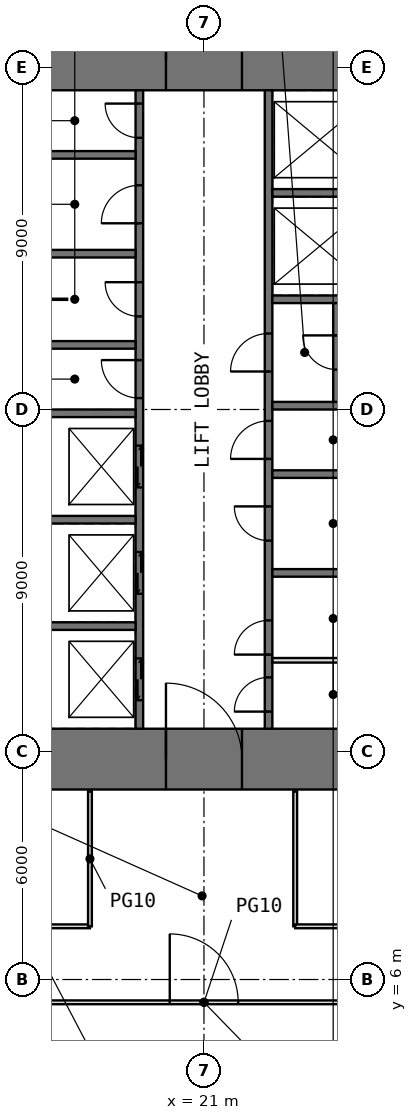
"""IFC4 building model, lengths in metres.
Left out: names, types, materials, properties, quantities, classifications, styles, units other than length and angle.
Written with IfcOpenShell. Run it as: python <this file> out.ifc"""

import sys

from ifc_helpers import new_model, si_unit, direction, frame, frame_2d, origin, place, context, subcontext, project, spatial, rectangle, extrude, element, fill, save


model = new_model("IFC4")
c1 = context("Model", 3, precision=1e-05, world=origin(), true_north=direction((0.0, 1.0)))
c2 = subcontext(c1, "Body", "Model", "MODEL_VIEW")
j1 = project(units=[si_unit("LENGTHUNIT", "METRE"), si_unit("PLANEANGLEUNIT", "RADIAN")], contexts=[c1])
p1 = place(None, origin())
s1 = spatial("IfcSite", under=j1, at=p1, CompositionType="ELEMENT")
p2 = place(p1, origin())
s2 = spatial("IfcBuilding", under=s1, at=p2, CompositionType="ELEMENT")
p3 = place(p2, frame((0.0, 0.0, 100.5)))
s3 = spatial("IfcBuildingStorey", under=s2, at=p3, CompositionType="ELEMENT", Elevation=100.5)
p4 = place(p3, frame((11.0, 11.8, -0.05), z_axis=(0.0, 0.0, 1.0), x_axis=(1.0, 0.0, 0.0)))
e1 = element("IfcWall", 1, at=p4, inside=s3, PredefinedType="SHEAR", context=c2, shape_type="SweptSolid", body=[
    extrude(rectangle(XDim=20.0, YDim=1.6, at=frame_2d((10.0, 0.0))), origin(), (0.0, 0.0, 1.0), 4.0),
])
p5 = place(p4, frame((9.0, 0.0, 0.05)))
e2 = element("IfcOpeningElement", 2, at=p5, cuts=e1, PredefinedType="OPENING", context=c2, shape_type="SweptSolid", body=[
    extrude(rectangle(XDim=2.0, YDim=2.2, at=frame_2d((1.0, 1.1))), frame((0.0, 0.81, 0.0), z_axis=(0.0, -1.0, 0.0), x_axis=(1.0, 0.0, 0.0)), (0.0, 0.0, 1.0), 1.62),
])
p6 = place(p3, frame((11.0, 30.2, -0.05), z_axis=(0.0, 0.0, 1.0), x_axis=(1.0, 0.0, 0.0)))
e3 = element("IfcWall", 3, at=p6, inside=s3, PredefinedType="SHEAR", context=c2, shape_type="SweptSolid", body=[
    extrude(rectangle(XDim=20.0, YDim=1.6, at=frame_2d((10.0, 0.0))), origin(), (0.0, 0.0, 1.0), 4.0),
])
p7 = place(p6, frame((9.0, 0.0, 0.05)))
e4 = element("IfcOpeningElement", 4, at=p7, cuts=e3, PredefinedType="OPENING", context=c2, shape_type="SweptSolid", body=[
    extrude(rectangle(XDim=2.0, YDim=2.2, at=frame_2d((1.0, 1.1))), frame((0.0, 0.81, 0.0), z_axis=(0.0, -1.0, 0.0), x_axis=(1.0, 0.0, 0.0)), (0.0, 0.0, 1.0), 1.62),
])
p8 = place(p3, frame((19.3, 12.6, -0.05), z_axis=(0.0, 0.0, 1.0), x_axis=(0.0, 1.0, 0.0)))
e5 = element("IfcWall", 5, at=p8, inside=s3, PredefinedType="SHEAR", context=c2, shape_type="SweptSolid", body=[
    extrude(rectangle(XDim=16.8, YDim=0.2, at=frame_2d((8.4, 0.0))), origin(), (0.0, 0.0, 1.0), 4.0),
])
p9 = place(p8, frame((8.7, 0.0, 0.05)))
e6 = element("IfcOpeningElement", 6, at=p9, cuts=e5, PredefinedType="OPENING", context=c2, shape_type="SweptSolid", body=[
    extrude(rectangle(XDim=1.0, YDim=2.2, at=frame_2d((0.5, 1.1))), frame((0.0, 0.11, 0.0), z_axis=(0.0, -1.0, 0.0), x_axis=(1.0, 0.0, 0.0)), (0.0, 0.0, 1.0), 0.22),
])
p10 = place(p8, frame((10.85, 0.0, 0.05)))
e7 = element("IfcOpeningElement", 7, at=p10, cuts=e5, PredefinedType="OPENING", context=c2, shape_type="SweptSolid", body=[
    extrude(rectangle(XDim=0.9, YDim=2.2, at=frame_2d((0.45, 1.1))), frame((0.0, 0.11, 0.0), z_axis=(0.0, -1.0, 0.0), x_axis=(1.0, 0.0, 0.0)), (0.0, 0.0, 1.0), 0.22),
])
p11 = place(p8, frame((13.3, 0.0, 0.05)))
e8 = element("IfcOpeningElement", 8, at=p11, cuts=e5, PredefinedType="OPENING", context=c2, shape_type="SweptSolid", body=[
    extrude(rectangle(XDim=1.0, YDim=2.2, at=frame_2d((0.5, 1.1))), frame((0.0, 0.11, 0.0), z_axis=(0.0, -1.0, 0.0), x_axis=(1.0, 0.0, 0.0)), (0.0, 0.0, 1.0), 0.22),
])
p12 = place(p8, frame((15.55, 0.0, 0.05)))
e9 = element("IfcOpeningElement", 9, at=p12, cuts=e5, PredefinedType="OPENING", context=c2, shape_type="SweptSolid", body=[
    extrude(rectangle(XDim=0.9, YDim=2.2, at=frame_2d((0.45, 1.1))), frame((0.0, 0.11, 0.0), z_axis=(0.0, -1.0, 0.0), x_axis=(1.0, 0.0, 0.0)), (0.0, 0.0, 1.0), 0.22),
])
p13 = place(p8, frame((0.75, 0.0, 0.05)))
e10 = element("IfcOpeningElement", 10, at=p13, cuts=e5, PredefinedType="OPENING", context=c2, shape_type="SweptSolid", body=[
    extrude(rectangle(XDim=1.1, YDim=2.2, at=frame_2d((0.55, 1.1))), frame((0.0, 0.11, 0.0), z_axis=(0.0, -1.0, 0.0), x_axis=(1.0, 0.0, 0.0)), (0.0, 0.0, 1.0), 0.22),
])
p14 = place(p8, frame((3.55, 0.0, 0.05)))
e11 = element("IfcOpeningElement", 11, at=p14, cuts=e5, PredefinedType="OPENING", context=c2, shape_type="SweptSolid", body=[
    extrude(rectangle(XDim=1.1, YDim=2.2, at=frame_2d((0.55, 1.1))), frame((0.0, 0.11, 0.0), z_axis=(0.0, -1.0, 0.0), x_axis=(1.0, 0.0, 0.0)), (0.0, 0.0, 1.0), 0.22),
])
p15 = place(p8, frame((6.35, 0.0, 0.05)))
e12 = element("IfcOpeningElement", 12, at=p15, cuts=e5, PredefinedType="OPENING", context=c2, shape_type="SweptSolid", body=[
    extrude(rectangle(XDim=1.1, YDim=2.2, at=frame_2d((0.55, 1.1))), frame((0.0, 0.11, 0.0), z_axis=(0.0, -1.0, 0.0), x_axis=(1.0, 0.0, 0.0)), (0.0, 0.0, 1.0), 0.22),
])
p16 = place(p3, frame((22.7, 12.6, -0.05), z_axis=(0.0, 0.0, 1.0), x_axis=(0.0, 1.0, 0.0)))
e13 = element("IfcWall", 13, at=p16, inside=s3, PredefinedType="SHEAR", context=c2, shape_type="SweptSolid", body=[
    extrude(rectangle(XDim=16.8, YDim=0.2, at=frame_2d((8.4, 0.0))), origin(), (0.0, 0.0, 1.0), 4.0),
])
p17 = place(p16, frame((0.45, 0.0, 0.05)))
e14 = element("IfcOpeningElement", 14, at=p17, cuts=e13, PredefinedType="OPENING", context=c2, shape_type="SweptSolid", body=[
    extrude(rectangle(XDim=0.9, YDim=2.2, at=frame_2d((0.45, 1.1))), frame((0.0, 0.11, 0.0), z_axis=(0.0, -1.0, 0.0), x_axis=(1.0, 0.0, 0.0)), (0.0, 0.0, 1.0), 0.22),
])
p18 = place(p16, frame((7.1, 0.0, 0.05)))
e15 = element("IfcOpeningElement", 15, at=p18, cuts=e13, PredefinedType="OPENING", context=c2, shape_type="SweptSolid", body=[
    extrude(rectangle(XDim=1.0, YDim=2.2, at=frame_2d((0.5, 1.1))), frame((0.0, 0.11, 0.0), z_axis=(0.0, -1.0, 0.0), x_axis=(1.0, 0.0, 0.0)), (0.0, 0.0, 1.0), 0.22),
])
p19 = place(p16, frame((1.95, 0.0, 0.05)))
e16 = element("IfcOpeningElement", 16, at=p19, cuts=e13, PredefinedType="OPENING", context=c2, shape_type="SweptSolid", body=[
    extrude(rectangle(XDim=0.9, YDim=2.2, at=frame_2d((0.45, 1.1))), frame((0.0, 0.11, 0.0), z_axis=(0.0, -1.0, 0.0), x_axis=(1.0, 0.0, 0.0)), (0.0, 0.0, 1.0), 0.22),
])
p20 = place(p16, frame((4.95, 0.0, 0.05)))
e17 = element("IfcOpeningElement", 17, at=p20, cuts=e13, PredefinedType="OPENING", context=c2, shape_type="SweptSolid", body=[
    extrude(rectangle(XDim=0.9, YDim=2.2, at=frame_2d((0.45, 1.1))), frame((0.0, 0.11, 0.0), z_axis=(0.0, -1.0, 0.0), x_axis=(1.0, 0.0, 0.0)), (0.0, 0.0, 1.0), 0.22),
])
p21 = place(p16, frame((9.4, 0.0, 0.05)))
e18 = element("IfcOpeningElement", 18, at=p21, cuts=e13, PredefinedType="OPENING", context=c2, shape_type="SweptSolid", body=[
    extrude(rectangle(XDim=1.0, YDim=2.2, at=frame_2d((0.5, 1.1))), frame((0.0, 0.11, 0.0), z_axis=(0.0, -1.0, 0.0), x_axis=(1.0, 0.0, 0.0)), (0.0, 0.0, 1.0), 0.22),
])
for number, where, z_axis, x_axis in (
    (19, (16.0, 15.3, -0.05), (0.0, 0.0, 1.0), (1.0, 0.0, 0.0)),
    (20, (16.0, 18.1, -0.05), (0.0, 0.0, 1.0), (1.0, 0.0, 0.0)),
    (21, (16.0, 20.9, -0.05), (0.0, 0.0, 1.0), (1.0, 0.0, 0.0)),
    (22, (16.0, 22.7, -0.05), (0.0, 0.0, 1.0), (1.0, 0.0, 0.0)),
    (23, (16.0, 25.1, -0.05), (0.0, 0.0, 1.0), (1.0, 0.0, 0.0)),
    (24, (16.0, 27.7, -0.05), (0.0, 0.0, 1.0), (1.0, 0.0, 0.0)),
    (25, (22.8, 16.7, -0.05), (0.0, 0.0, 1.0), (1.0, 0.0, 0.0)),
    (26, (22.8, 19.3, -0.05), (0.0, 0.0, 1.0), (1.0, 0.0, 0.0)),
    (27, (22.8, 21.1, -0.05), (0.0, 0.0, 1.0), (1.0, 0.0, 0.0)),
    (28, (22.8, 23.9, -0.05), (0.0, 0.0, 1.0), (1.0, 0.0, 0.0)),
    (29, (22.8, 26.7, -0.05), (0.0, 0.0, 1.0), (1.0, 0.0, 0.0)),
):
    element("IfcWall", number, at=place(p3, frame(where, z_axis=z_axis, x_axis=x_axis)), inside=s3, PredefinedType="SHEAR", context=c2, shape_type="SweptSolid", body=[
        extrude(rectangle(XDim=3.2, YDim=0.2, at=frame_2d((1.6, 0.0))), origin(), (0.0, 0.0, 1.0), 4.0),
    ])
p22 = place(p3, frame((22.8, 14.4, 0.0), z_axis=(0.0, 0.0, 1.0), x_axis=(1.0, 0.0, 0.0)))
e30 = element("IfcWall", 30, at=p22, inside=s3, PredefinedType="PARTITIONING", context=c2, shape_type="SweptSolid", body=[
    extrude(rectangle(XDim=3.2, YDim=0.12, at=frame_2d((1.6, 0.0))), origin(), (0.0, 0.0, 1.0), 3.75),
])
p23 = place(p3, frame((16.0, 23.9, 0.0), z_axis=(0.0, 0.0, 1.0), x_axis=(1.0, 0.0, 0.0)))
e31 = element("IfcWall", 31, at=p23, inside=s3, PredefinedType="PARTITIONING", context=c2, shape_type="SweptSolid", body=[
    extrude(rectangle(XDim=1.4, YDim=0.03, at=frame_2d((0.7, 0.0))), origin(), (0.0, 0.0, 1.0), 3.75),
])
p24 = place(p3, frame((24.5, 21.2, -0.05), z_axis=(0.0, 0.0, 1.0), x_axis=(0.0, 1.0, 0.0)))
e32 = element("IfcWall", 32, at=p24, inside=s3, PredefinedType="SHEAR", context=c2, shape_type="SweptSolid", body=[
    extrude(rectangle(XDim=2.6, YDim=0.2, at=frame_2d((1.3, 0.0))), origin(), (0.0, 0.0, 1.0), 4.0),
])
p25 = place(p24, frame((0.85, 0.0, 0.05)))
e33 = element("IfcOpeningElement", 33, at=p25, cuts=e32, PredefinedType="OPENING", context=c2, shape_type="SweptSolid", body=[
    extrude(rectangle(XDim=0.9, YDim=2.2, at=frame_2d((0.45, 1.1))), frame((0.0, 0.11, 0.0), z_axis=(0.0, -1.0, 0.0), x_axis=(1.0, 0.0, 0.0)), (0.0, 0.0, 1.0), 0.22),
])
p26 = place(p3, frame((14.6, 7.4, 0.0), z_axis=(0.0, 0.0, 1.0), x_axis=(1.0, 0.0, 0.0)))
e34 = element("IfcWall", 34, at=p26, inside=s3, PredefinedType="PARTITIONING", context=c2, shape_type="SweptSolid", body=[
    extrude(rectangle(XDim=3.4, YDim=0.1, at=frame_2d((1.7, 0.0))), origin(), (0.0, 0.0, 1.0), 3.75),
])
p27 = place(p26, frame((1.2, 0.0, 0.0)))
e35 = element("IfcOpeningElement", 35, at=p27, cuts=e34, PredefinedType="OPENING", context=c2, shape_type="SweptSolid", body=[
    extrude(rectangle(XDim=1.0, YDim=2.4, at=frame_2d((0.5, 1.2))), frame((0.0, 0.06, 0.0), z_axis=(0.0, -1.0, 0.0), x_axis=(1.0, 0.0, 0.0)), (0.0, 0.0, 1.0), 0.12),
])
p28 = place(p3, frame((16.0, 5.4, 0.0), z_axis=(0.0, 0.0, 1.0), x_axis=(1.0, 0.0, 0.0)))
e36 = element("IfcWall", 36, at=p28, inside=s3, PredefinedType="PARTITIONING", context=c2, shape_type="SweptSolid", body=[
    extrude(rectangle(XDim=10.0, YDim=0.1, at=frame_2d((5.0, 0.0))), origin(), (0.0, 0.0, 1.0), 3.75),
])
p29 = place(p28, frame((4.1, 0.0, 0.0)))
e37 = element("IfcOpeningElement", 37, at=p29, cuts=e36, PredefinedType="OPENING", context=c2, shape_type="SweptSolid", body=[
    extrude(rectangle(XDim=1.8, YDim=2.4, at=frame_2d((0.9, 1.2))), frame((0.0, 0.06, 0.0), z_axis=(0.0, -1.0, 0.0), x_axis=(1.0, 0.0, 0.0)), (0.0, 0.0, 1.0), 0.12),
])
for number, where, z_axis, x_axis in (
    (38, (18.0, 7.4, 0.0), (0.0, 0.0, 1.0), (0.0, 1.0, 0.0)),
    (39, (23.4, 7.4, 0.0), (0.0, 0.0, 1.0), (0.0, 1.0, 0.0)),
):
    element("IfcWall", number, at=place(p3, frame(where, z_axis=z_axis, x_axis=x_axis)), inside=s3, PredefinedType="PARTITIONING", context=c2, shape_type="SweptSolid", body=[
        extrude(rectangle(XDim=3.55, YDim=0.1, at=frame_2d((1.775, 0.0))), origin(), (0.0, 0.0, 1.0), 3.75),
    ])
p30 = place(p3, frame((23.4, 7.4, 0.0), z_axis=(0.0, 0.0, 1.0), x_axis=(1.0, 0.0, 0.0)))
e40 = element("IfcWall", 40, at=p30, inside=s3, PredefinedType="PARTITIONING", context=c2, shape_type="SweptSolid", body=[
    extrude(rectangle(XDim=4.2, YDim=0.1, at=frame_2d((2.1, 0.0))), origin(), (0.0, 0.0, 1.0), 3.75),
])
p31 = place(p30, frame((1.6, 0.0, 0.0)))
e41 = element("IfcOpeningElement", 41, at=p31, cuts=e40, PredefinedType="OPENING", context=c2, shape_type="SweptSolid", body=[
    extrude(rectangle(XDim=1.0, YDim=2.4, at=frame_2d((0.5, 1.2))), frame((0.0, 0.06, 0.0), z_axis=(0.0, -1.0, 0.0), x_axis=(1.0, 0.0, 0.0)), (0.0, 0.0, 1.0), 0.12),
])
p32 = place(p5, origin())
e42 = element("IfcDoor", 42, at=p32, inside=s3, OperationType="DOUBLE_DOOR_SINGLE_SWING", PredefinedType="DOOR", context=c2, shape_type="SweptSolid", body=[
    extrude(rectangle(XDim=2.0, YDim=2.2, at=frame_2d((1.0, 1.1))), frame((0.0, 0.025, 0.0), z_axis=(0.0, -1.0, 0.0), x_axis=(1.0, 0.0, 0.0)), (0.0, 0.0, 1.0), 0.05),
])
fill(e2, e42)
p33 = place(p7, origin())
e43 = element("IfcDoor", 43, at=p33, inside=s3, OperationType="DOUBLE_DOOR_SINGLE_SWING", PredefinedType="DOOR", context=c2, shape_type="SweptSolid", body=[
    extrude(rectangle(XDim=2.0, YDim=2.2, at=frame_2d((1.0, 1.1))), frame((0.0, 0.025, 0.0), z_axis=(0.0, -1.0, 0.0), x_axis=(1.0, 0.0, 0.0)), (0.0, 0.0, 1.0), 0.05),
])
fill(e4, e43)
p34 = place(p17, origin())
e44 = element("IfcDoor", 44, at=p34, inside=s3, OperationType="SINGLE_SWING_LEFT", PredefinedType="DOOR", context=c2, shape_type="SweptSolid", body=[
    extrude(rectangle(XDim=0.9, YDim=2.2, at=frame_2d((0.45, 1.1))), frame((0.0, 0.025, 0.0), z_axis=(0.0, -1.0, 0.0), x_axis=(1.0, 0.0, 0.0)), (0.0, 0.0, 1.0), 0.05),
])
fill(e14, e44)
p35 = place(p9, origin())
e45 = element("IfcDoor", 45, at=p35, inside=s3, OperationType="SINGLE_SWING_RIGHT", PredefinedType="DOOR", context=c2, shape_type="SweptSolid", body=[
    extrude(rectangle(XDim=1.0, YDim=2.2, at=frame_2d((0.5, 1.1))), frame((0.0, 0.025, 0.0), z_axis=(0.0, -1.0, 0.0), x_axis=(1.0, 0.0, 0.0)), (0.0, 0.0, 1.0), 0.05),
])
fill(e6, e45)
p36 = place(p18, origin())
e46 = element("IfcDoor", 46, at=p36, inside=s3, OperationType="SINGLE_SWING_LEFT", PredefinedType="DOOR", context=c2, shape_type="SweptSolid", body=[
    extrude(rectangle(XDim=1.0, YDim=2.2, at=frame_2d((0.5, 1.1))), frame((0.0, 0.025, 0.0), z_axis=(0.0, -1.0, 0.0), x_axis=(1.0, 0.0, 0.0)), (0.0, 0.0, 1.0), 0.05),
])
fill(e15, e46)
p37 = place(p10, origin())
e47 = element("IfcDoor", 47, at=p37, inside=s3, OperationType="SINGLE_SWING_RIGHT", PredefinedType="DOOR", context=c2, shape_type="SweptSolid", body=[
    extrude(rectangle(XDim=0.9, YDim=2.2, at=frame_2d((0.45, 1.1))), frame((0.0, 0.025, 0.0), z_axis=(0.0, -1.0, 0.0), x_axis=(1.0, 0.0, 0.0)), (0.0, 0.0, 1.0), 0.05),
])
fill(e7, e47)
p38 = place(p11, origin())
e48 = element("IfcDoor", 48, at=p38, inside=s3, OperationType="SINGLE_SWING_LEFT", PredefinedType="DOOR", context=c2, shape_type="SweptSolid", body=[
    extrude(rectangle(XDim=1.0, YDim=2.2, at=frame_2d((0.5, 1.1))), frame((0.0, 0.025, 0.0), z_axis=(0.0, -1.0, 0.0), x_axis=(1.0, 0.0, 0.0)), (0.0, 0.0, 1.0), 0.05),
])
fill(e8, e48)
p39 = place(p12, origin())
e49 = element("IfcDoor", 49, at=p39, inside=s3, OperationType="SINGLE_SWING_RIGHT", PredefinedType="DOOR", context=c2, shape_type="SweptSolid", body=[
    extrude(rectangle(XDim=0.9, YDim=2.2, at=frame_2d((0.45, 1.1))), frame((0.0, 0.025, 0.0), z_axis=(0.0, -1.0, 0.0), x_axis=(1.0, 0.0, 0.0)), (0.0, 0.0, 1.0), 0.05),
])
fill(e9, e49)
p40 = place(p19, origin())
e50 = element("IfcDoor", 50, at=p40, inside=s3, OperationType="SINGLE_SWING_LEFT", PredefinedType="DOOR", context=c2, shape_type="SweptSolid", body=[
    extrude(rectangle(XDim=0.9, YDim=2.2, at=frame_2d((0.45, 1.1))), frame((0.0, 0.025, 0.0), z_axis=(0.0, -1.0, 0.0), x_axis=(1.0, 0.0, 0.0)), (0.0, 0.0, 1.0), 0.05),
])
fill(e16, e50)
p41 = place(p20, origin())
e51 = element("IfcDoor", 51, at=p41, inside=s3, OperationType="SINGLE_SWING_RIGHT", PredefinedType="DOOR", context=c2, shape_type="SweptSolid", body=[
    extrude(rectangle(XDim=0.9, YDim=2.2, at=frame_2d((0.45, 1.1))), frame((0.0, 0.025, 0.0), z_axis=(0.0, -1.0, 0.0), x_axis=(1.0, 0.0, 0.0)), (0.0, 0.0, 1.0), 0.05),
])
fill(e17, e51)
p42 = place(p21, origin())
e52 = element("IfcDoor", 52, at=p42, inside=s3, OperationType="SINGLE_SWING_LEFT", PredefinedType="DOOR", context=c2, shape_type="SweptSolid", body=[
    extrude(rectangle(XDim=1.0, YDim=2.2, at=frame_2d((0.5, 1.1))), frame((0.0, 0.025, 0.0), z_axis=(0.0, -1.0, 0.0), x_axis=(1.0, 0.0, 0.0)), (0.0, 0.0, 1.0), 0.05),
])
fill(e18, e52)
p43 = place(p25, origin())
e53 = element("IfcDoor", 53, at=p43, inside=s3, OperationType="SINGLE_SWING_RIGHT", PredefinedType="DOOR", context=c2, shape_type="SweptSolid", body=[
    extrude(rectangle(XDim=0.9, YDim=2.2, at=frame_2d((0.45, 1.1))), frame((0.0, 0.025, 0.0), z_axis=(0.0, -1.0, 0.0), x_axis=(1.0, 0.0, 0.0)), (0.0, 0.0, 1.0), 0.05),
])
fill(e33, e53)
p44 = place(p29, origin())
e54 = element("IfcDoor", 54, at=p44, inside=s3, OperationType="DOUBLE_DOOR_SINGLE_SWING", PredefinedType="DOOR", context=c2, shape_type="SweptSolid", body=[
    extrude(rectangle(XDim=1.8, YDim=2.4, at=frame_2d((0.9, 1.2))), frame((0.0, 0.025, 0.0), z_axis=(0.0, -1.0, 0.0), x_axis=(1.0, 0.0, 0.0)), (0.0, 0.0, 1.0), 0.05),
])
fill(e37, e54)
p45 = place(p13, origin())
e55 = element("IfcDoor", 55, at=p45, inside=s3, OperationType="DOUBLE_DOOR_SLIDING", PredefinedType="DOOR", context=c2, shape_type="SweptSolid", body=[
    extrude(rectangle(XDim=1.1, YDim=2.2, at=frame_2d((0.55, 1.1))), frame((0.0, 0.025, 0.0), z_axis=(0.0, -1.0, 0.0), x_axis=(1.0, 0.0, 0.0)), (0.0, 0.0, 1.0), 0.05),
])
fill(e10, e55)
p46 = place(p14, origin())
e56 = element("IfcDoor", 56, at=p46, inside=s3, OperationType="DOUBLE_DOOR_SLIDING", PredefinedType="DOOR", context=c2, shape_type="SweptSolid", body=[
    extrude(rectangle(XDim=1.1, YDim=2.2, at=frame_2d((0.55, 1.1))), frame((0.0, 0.025, 0.0), z_axis=(0.0, -1.0, 0.0), x_axis=(1.0, 0.0, 0.0)), (0.0, 0.0, 1.0), 0.05),
])
fill(e11, e56)
p47 = place(p15, origin())
e57 = element("IfcDoor", 57, at=p47, inside=s3, OperationType="DOUBLE_DOOR_SLIDING", PredefinedType="DOOR", context=c2, shape_type="SweptSolid", body=[
    extrude(rectangle(XDim=1.1, YDim=2.2, at=frame_2d((0.55, 1.1))), frame((0.0, 0.025, 0.0), z_axis=(0.0, -1.0, 0.0), x_axis=(1.0, 0.0, 0.0)), (0.0, 0.0, 1.0), 0.05),
])
fill(e12, e57)
save(model, sys.argv[1])
